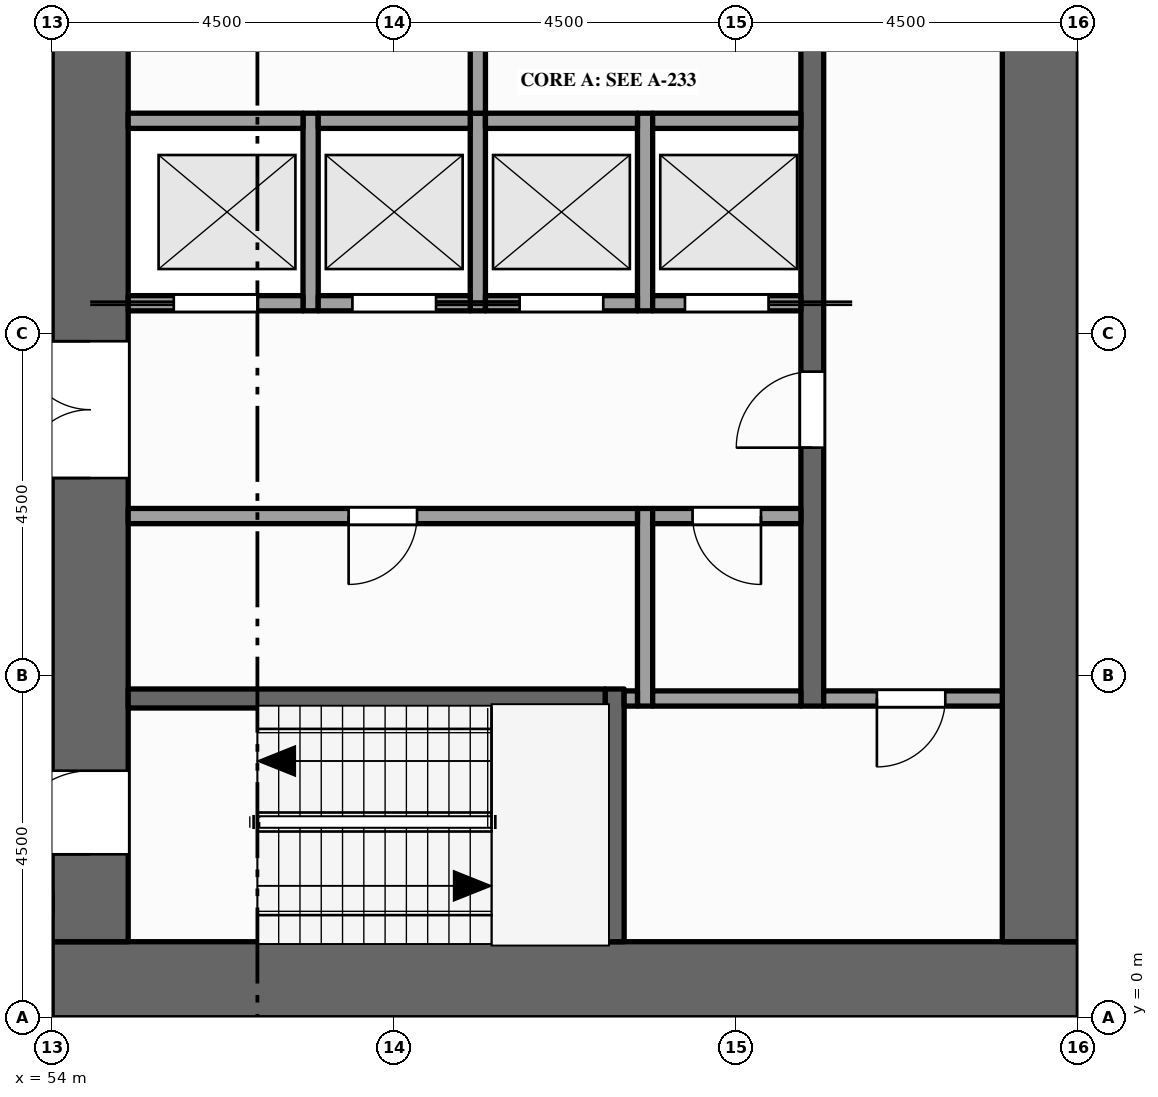
"""IFC4 building model, lengths in metres.
Left out: names, types, materials, properties, quantities, classifications, styles, units other than length and angle.
Written with IfcOpenShell. Run it as: python <this file> out.ifc"""

import sys

from ifc_helpers import new_model, si_unit, direction, frame, frame_2d, origin, place, context, subcontext, project, spatial, rectangle, extrude, element, fill, save


model = new_model("IFC4")
c1 = context("Model", 3, precision=1e-05, world=origin(), true_north=direction((0.0, 1.0)))
c2 = subcontext(c1, "Body", "Model", "MODEL_VIEW")
j1 = project(units=[si_unit("LENGTHUNIT", "METRE"), si_unit("PLANEANGLEUNIT", "RADIAN")], contexts=[c1])
p1 = place(None, origin())
s1 = spatial("IfcSite", under=j1, at=p1, CompositionType="ELEMENT")
p2 = place(p1, origin())
s2 = spatial("IfcBuilding", under=s1, at=p2, CompositionType="ELEMENT")
p3 = place(p2, frame((0.0, 0.0, 183.0)))
s3 = spatial("IfcBuildingStorey", under=s2, at=p3, CompositionType="ELEMENT", Elevation=183.0)
p4 = place(p3, frame((67.5, 0.5, -0.15), z_axis=(0.0, 0.0, 1.0), x_axis=(-1.0, 0.0, 0.0)))
e1 = element("IfcWall", 1, at=p4, inside=s3, PredefinedType="SHEAR", context=c2, shape_type="SweptSolid", body=[
    extrude(rectangle(XDim=13.5, YDim=1.0, at=frame_2d((6.75, 0.0))), origin(), (0.0, 0.0, 1.0), 4.0),
])
p5 = place(p3, frame((54.5, 1.0, -0.15), z_axis=(0.0, 0.0, 1.0), x_axis=(0.0, 1.0, 0.0)))
e2 = element("IfcWall", 2, at=p5, inside=s3, PredefinedType="SHEAR", context=c2, shape_type="SweptSolid", body=[
    extrude(rectangle(XDim=20.5, YDim=1.0, at=frame_2d((10.25, 0.0))), origin(), (0.0, 0.0, 1.0), 4.0),
])
p6 = place(p5, frame((6.1, 0.0, 0.15)))
e3 = element("IfcOpeningElement", 3, at=p6, cuts=e2, PredefinedType="OPENING", context=c2, shape_type="SweptSolid", body=[
    extrude(rectangle(XDim=1.8, YDim=2.1, at=frame_2d((0.9, 1.05))), frame((0.0, 0.51, 0.0), z_axis=(0.0, -1.0, 0.0), x_axis=(1.0, 0.0, 0.0)), (0.0, 0.0, 1.0), 1.02),
])
p7 = place(p5, frame((12.15, 0.0, 0.15)))
e4 = element("IfcOpeningElement", 4, at=p7, cuts=e2, PredefinedType="OPENING", context=c2, shape_type="SweptSolid", body=[
    extrude(rectangle(XDim=1.1, YDim=2.1, at=frame_2d((0.55, 1.05))), frame((0.0, 0.51, 0.0), z_axis=(0.0, -1.0, 0.0), x_axis=(1.0, 0.0, 0.0)), (0.0, 0.0, 1.0), 1.02),
])
p8 = place(p5, frame((1.15, 0.0, 0.15)))
e5 = element("IfcOpeningElement", 5, at=p8, cuts=e2, PredefinedType="OPENING", context=c2, shape_type="SweptSolid", body=[
    extrude(rectangle(XDim=1.1, YDim=2.1, at=frame_2d((0.55, 1.05))), frame((0.0, 0.51, 0.0), z_axis=(0.0, -1.0, 0.0), x_axis=(1.0, 0.0, 0.0)), (0.0, 0.0, 1.0), 1.02),
])
p9 = place(p5, frame((18.35, 0.0, 0.15)))
e6 = element("IfcOpeningElement", 6, at=p9, cuts=e2, PredefinedType="OPENING", context=c2, shape_type="SweptSolid", body=[
    extrude(rectangle(XDim=1.1, YDim=2.1, at=frame_2d((0.55, 1.05))), frame((0.0, 0.51, 0.0), z_axis=(0.0, -1.0, 0.0), x_axis=(1.0, 0.0, 0.0)), (0.0, 0.0, 1.0), 1.02),
])
p10 = place(p3, frame((67.0, 1.0, -0.15), z_axis=(0.0, 0.0, 1.0), x_axis=(0.0, 1.0, 0.0)))
e7 = element("IfcWall", 7, at=p10, inside=s3, PredefinedType="SHEAR", context=c2, shape_type="SweptSolid", body=[
    extrude(rectangle(XDim=20.5, YDim=1.0, at=frame_2d((10.25, 0.0))), origin(), (0.0, 0.0, 1.0), 4.0),
])
for number, where, z_axis, x_axis in (
    (8, (57.4, 9.3, 0.0), (0.0, 0.0, 1.0), (0.0, 1.0, 0.0)),
    (9, (59.6, 9.3, 0.0), (0.0, 0.0, 1.0), (0.0, 1.0, 0.0)),
):
    element("IfcWall", number, at=place(p3, frame(where, z_axis=z_axis, x_axis=x_axis)), inside=s3, PredefinedType="SOLIDWALL", context=c2, shape_type="SweptSolid", body=[
        extrude(rectangle(XDim=2.6, YDim=0.2, at=frame_2d((1.3, 0.0))), origin(), (0.0, 0.0, 1.0), 3.75),
    ])
p11 = place(p3, frame((59.6, 11.9, 0.0), z_axis=(0.0, 0.0, 1.0), x_axis=(0.0, 1.0, 0.0)))
e10 = element("IfcWall", 10, at=p11, inside=s3, PredefinedType="PARTITIONING", context=c2, shape_type="SweptSolid", body=[
    extrude(rectangle(XDim=3.6, YDim=0.2, at=frame_2d((1.8, 0.0))), origin(), (0.0, 0.0, 1.0), 3.75),
])
p12 = place(p11, frame((1.3, 0.0, 0.0)))
e11 = element("IfcOpeningElement", 11, at=p12, cuts=e10, PredefinedType="OPENING", context=c2, shape_type="SweptSolid", body=[
    extrude(rectangle(XDim=1.0, YDim=2.1, at=frame_2d((0.5, 1.05))), frame((0.0, 0.11, 0.0), z_axis=(0.0, -1.0, 0.0), x_axis=(1.0, 0.0, 0.0)), (0.0, 0.0, 1.0), 0.22),
])
p13 = place(p3, frame((61.4, 1.0, 0.0), z_axis=(0.0, 0.0, 1.0), x_axis=(0.0, 1.0, 0.0)))
e12 = element("IfcWall", 12, at=p13, inside=s3, PredefinedType="SHEAR", context=c2, shape_type="SweptSolid", body=[
    extrude(rectangle(XDim=3.325, YDim=0.25, at=frame_2d((1.663, 0.0))), origin(), (0.0, 0.0, 1.0), 3.75),
])
p14 = place(p3, frame((61.8, 4.1, 0.0), z_axis=(0.0, 0.0, 1.0), x_axis=(0.0, 1.0, 0.0)))
e13 = element("IfcWall", 13, at=p14, inside=s3, PredefinedType="PARTITIONING", context=c2, shape_type="SweptSolid", body=[
    extrude(rectangle(XDim=2.6, YDim=0.2, at=frame_2d((1.3, 0.0))), origin(), (0.0, 0.0, 1.0), 3.75),
])
p15 = place(p3, frame((61.8, 9.3, 0.0), z_axis=(0.0, 0.0, 1.0), x_axis=(0.0, 1.0, 0.0)))
e14 = element("IfcWall", 14, at=p15, inside=s3, PredefinedType="SOLIDWALL", context=c2, shape_type="SweptSolid", body=[
    extrude(rectangle(XDim=2.6, YDim=0.2, at=frame_2d((1.3, 0.0))), origin(), (0.0, 0.0, 1.0), 3.75),
])
p16 = place(p3, frame((64.0, 4.1, 0.0), z_axis=(0.0, 0.0, 1.0), x_axis=(0.0, 1.0, 0.0)))
e15 = element("IfcWall", 15, at=p16, inside=s3, PredefinedType="SHEAR", context=c2, shape_type="SweptSolid", body=[
    extrude(rectangle(XDim=14.5, YDim=0.3, at=frame_2d((7.25, 0.0))), origin(), (0.0, 0.0, 1.0), 3.75),
])
p17 = place(p16, frame((3.4, 0.0, 0.0)))
e16 = element("IfcOpeningElement", 16, at=p17, cuts=e15, PredefinedType="OPENING", context=c2, shape_type="SweptSolid", body=[
    extrude(rectangle(XDim=1.0, YDim=2.1, at=frame_2d((0.5, 1.05))), frame((0.0, 0.16, 0.0), z_axis=(0.0, -1.0, 0.0), x_axis=(1.0, 0.0, 0.0)), (0.0, 0.0, 1.0), 0.32),
])
p18 = place(p16, frame((9.1, 0.0, 0.0)))
e17 = element("IfcOpeningElement", 17, at=p18, cuts=e15, PredefinedType="OPENING", context=c2, shape_type="SweptSolid", body=[
    extrude(rectangle(XDim=1.0, YDim=2.1, at=frame_2d((0.5, 1.05))), frame((0.0, 0.16, 0.0), z_axis=(0.0, -1.0, 0.0), x_axis=(1.0, 0.0, 0.0)), (0.0, 0.0, 1.0), 0.32),
])
p19 = place(p3, frame((55.0, 4.2, 0.0), z_axis=(0.0, 0.0, 1.0), x_axis=(1.0, 0.0, 0.0)))
e18 = element("IfcWall", 18, at=p19, inside=s3, PredefinedType="SHEAR", context=c2, shape_type="SweptSolid", body=[
    extrude(rectangle(XDim=6.275, YDim=0.25, at=frame_2d((3.137, 0.0))), origin(), (0.0, 0.0, 1.0), 3.75),
])
p20 = place(p3, frame((61.525, 4.2, 0.0), z_axis=(0.0, 0.0, 1.0), x_axis=(1.0, 0.0, 0.0)))
e19 = element("IfcWall", 19, at=p20, inside=s3, PredefinedType="PARTITIONING", context=c2, shape_type="SweptSolid", body=[
    extrude(rectangle(XDim=0.175, YDim=0.2, at=frame_2d((0.087, 0.0))), origin(), (0.0, 0.0, 1.0), 3.75),
])
p21 = place(p3, frame((61.9, 4.2, 0.0), z_axis=(0.0, 0.0, 1.0), x_axis=(1.0, 0.0, 0.0)))
e20 = element("IfcWall", 20, at=p21, inside=s3, PredefinedType="PARTITIONING", context=c2, shape_type="SweptSolid", body=[
    extrude(rectangle(XDim=1.95, YDim=0.2, at=frame_2d((0.975, 0.0))), origin(), (0.0, 0.0, 1.0), 3.75),
])
p22 = place(p3, frame((64.15, 4.2, 0.0), z_axis=(0.0, 0.0, 1.0), x_axis=(1.0, 0.0, 0.0)))
e21 = element("IfcWall", 21, at=p22, inside=s3, PredefinedType="PARTITIONING", context=c2, shape_type="SweptSolid", body=[
    extrude(rectangle(XDim=2.35, YDim=0.2, at=frame_2d((1.175, 0.0))), origin(), (0.0, 0.0, 1.0), 3.75),
])
p23 = place(p22, frame((0.7, 0.0, 0.0)))
e22 = element("IfcOpeningElement", 22, at=p23, cuts=e21, PredefinedType="OPENING", context=c2, shape_type="SweptSolid", body=[
    extrude(rectangle(XDim=0.9, YDim=2.1, at=frame_2d((0.45, 1.05))), frame((0.0, 0.11, 0.0), z_axis=(0.0, -1.0, 0.0), x_axis=(1.0, 0.0, 0.0)), (0.0, 0.0, 1.0), 0.22),
])
p24 = place(p3, frame((55.0, 6.6, 0.0), z_axis=(0.0, 0.0, 1.0), x_axis=(1.0, 0.0, 0.0)))
e23 = element("IfcWall", 23, at=p24, inside=s3, PredefinedType="PARTITIONING", context=c2, shape_type="SweptSolid", body=[
    extrude(rectangle(XDim=6.7, YDim=0.2, at=frame_2d((3.35, 0.0))), origin(), (0.0, 0.0, 1.0), 3.75),
])
p25 = place(p24, frame((2.9, 0.0, 0.0)))
e24 = element("IfcOpeningElement", 24, at=p25, cuts=e23, PredefinedType="OPENING", context=c2, shape_type="SweptSolid", body=[
    extrude(rectangle(XDim=0.9, YDim=2.1, at=frame_2d((0.45, 1.05))), frame((0.0, 0.11, 0.0), z_axis=(0.0, -1.0, 0.0), x_axis=(1.0, 0.0, 0.0)), (0.0, 0.0, 1.0), 0.22),
])
p26 = place(p3, frame((61.9, 6.6, 0.0), z_axis=(0.0, 0.0, 1.0), x_axis=(1.0, 0.0, 0.0)))
e25 = element("IfcWall", 25, at=p26, inside=s3, PredefinedType="PARTITIONING", context=c2, shape_type="SweptSolid", body=[
    extrude(rectangle(XDim=1.95, YDim=0.2, at=frame_2d((0.975, 0.0))), origin(), (0.0, 0.0, 1.0), 3.75),
])
p27 = place(p26, frame((0.525, 0.0, 0.0)))
e26 = element("IfcOpeningElement", 26, at=p27, cuts=e25, PredefinedType="OPENING", context=c2, shape_type="SweptSolid", body=[
    extrude(rectangle(XDim=0.9, YDim=2.1, at=frame_2d((0.45, 1.05))), frame((0.0, 0.11, 0.0), z_axis=(0.0, -1.0, 0.0), x_axis=(1.0, 0.0, 0.0)), (0.0, 0.0, 1.0), 0.22),
])
p28 = place(p3, frame((55.0, 9.4, 0.0), z_axis=(0.0, 0.0, 1.0), x_axis=(1.0, 0.0, 0.0)))
e27 = element("IfcWall", 27, at=p28, inside=s3, PredefinedType="SOLIDWALL", context=c2, shape_type="SweptSolid", body=[
    extrude(rectangle(XDim=2.3, YDim=0.2, at=frame_2d((1.15, 0.0))), origin(), (0.0, 0.0, 1.0), 3.75),
])
p29 = place(p28, frame((0.6, 0.0, 0.012)))
e28 = element("IfcOpeningElement", 28, at=p29, cuts=e27, PredefinedType="OPENING", context=c2, shape_type="SweptSolid", body=[
    extrude(rectangle(XDim=1.1, YDim=2.1, at=frame_2d((0.55, 1.05))), frame((0.0, 0.11, 0.0), z_axis=(0.0, -1.0, 0.0), x_axis=(1.0, 0.0, 0.0)), (0.0, 0.0, 1.0), 0.22),
])
p30 = place(p3, frame((57.5, 9.4, 0.0), z_axis=(0.0, 0.0, 1.0), x_axis=(1.0, 0.0, 0.0)))
e29 = element("IfcWall", 29, at=p30, inside=s3, PredefinedType="SOLIDWALL", context=c2, shape_type="SweptSolid", body=[
    extrude(rectangle(XDim=2.0, YDim=0.2, at=frame_2d((1.0, 0.0))), origin(), (0.0, 0.0, 1.0), 3.75),
])
p31 = place(p30, frame((0.45, 0.0, 0.012)))
e30 = element("IfcOpeningElement", 30, at=p31, cuts=e29, PredefinedType="OPENING", context=c2, shape_type="SweptSolid", body=[
    extrude(rectangle(XDim=1.1, YDim=2.1, at=frame_2d((0.55, 1.05))), frame((0.0, 0.11, 0.0), z_axis=(0.0, -1.0, 0.0), x_axis=(1.0, 0.0, 0.0)), (0.0, 0.0, 1.0), 0.22),
])
p32 = place(p3, frame((59.7, 9.4, 0.0), z_axis=(0.0, 0.0, 1.0), x_axis=(1.0, 0.0, 0.0)))
e31 = element("IfcWall", 31, at=p32, inside=s3, PredefinedType="SOLIDWALL", context=c2, shape_type="SweptSolid", body=[
    extrude(rectangle(XDim=2.0, YDim=0.2, at=frame_2d((1.0, 0.0))), origin(), (0.0, 0.0, 1.0), 3.75),
])
p33 = place(p32, frame((0.45, 0.0, 0.012)))
e32 = element("IfcOpeningElement", 32, at=p33, cuts=e31, PredefinedType="OPENING", context=c2, shape_type="SweptSolid", body=[
    extrude(rectangle(XDim=1.1, YDim=2.1, at=frame_2d((0.55, 1.05))), frame((0.0, 0.11, 0.0), z_axis=(0.0, -1.0, 0.0), x_axis=(1.0, 0.0, 0.0)), (0.0, 0.0, 1.0), 0.22),
])
p34 = place(p3, frame((61.9, 9.4, 0.0), z_axis=(0.0, 0.0, 1.0), x_axis=(1.0, 0.0, 0.0)))
e33 = element("IfcWall", 33, at=p34, inside=s3, PredefinedType="SOLIDWALL", context=c2, shape_type="SweptSolid", body=[
    extrude(rectangle(XDim=1.95, YDim=0.2, at=frame_2d((0.975, 0.0))), origin(), (0.0, 0.0, 1.0), 3.75),
])
p35 = place(p34, frame((0.425, 0.0, 0.012)))
e34 = element("IfcOpeningElement", 34, at=p35, cuts=e33, PredefinedType="OPENING", context=c2, shape_type="SweptSolid", body=[
    extrude(rectangle(XDim=1.1, YDim=2.1, at=frame_2d((0.55, 1.05))), frame((0.0, 0.11, 0.0), z_axis=(0.0, -1.0, 0.0), x_axis=(1.0, 0.0, 0.0)), (0.0, 0.0, 1.0), 0.22),
])
p36 = place(p3, frame((55.0, 11.8, 0.0), z_axis=(0.0, 0.0, 1.0), x_axis=(1.0, 0.0, 0.0)))
e35 = element("IfcWall", 35, at=p36, inside=s3, PredefinedType="SOLIDWALL", context=c2, shape_type="SweptSolid", body=[
    extrude(rectangle(XDim=2.3, YDim=0.2, at=frame_2d((1.15, 0.0))), origin(), (0.0, 0.0, 1.0), 3.75),
])
for number, where, z_axis, x_axis in (
    (36, (57.5, 11.8, 0.0), (0.0, 0.0, 1.0), (1.0, 0.0, 0.0)),
    (37, (59.7, 11.8, 0.0), (0.0, 0.0, 1.0), (1.0, 0.0, 0.0)),
):
    element("IfcWall", number, at=place(p3, frame(where, z_axis=z_axis, x_axis=x_axis)), inside=s3, PredefinedType="SOLIDWALL", context=c2, shape_type="SweptSolid", body=[
        extrude(rectangle(XDim=2.0, YDim=0.2, at=frame_2d((1.0, 0.0))), origin(), (0.0, 0.0, 1.0), 3.75),
    ])
p37 = place(p3, frame((61.9, 11.8, 0.0), z_axis=(0.0, 0.0, 1.0), x_axis=(1.0, 0.0, 0.0)))
e38 = element("IfcWall", 38, at=p37, inside=s3, PredefinedType="SOLIDWALL", context=c2, shape_type="SweptSolid", body=[
    extrude(rectangle(XDim=1.95, YDim=0.2, at=frame_2d((0.975, 0.0))), origin(), (0.0, 0.0, 1.0), 3.75),
])
p38 = place(p29, origin())
e39 = element("IfcDoor", 39, at=p38, inside=s3, OperationType="SLIDING_TO_LEFT", PredefinedType="DOOR", context=c2, shape_type="SweptSolid", body=[
    extrude(rectangle(XDim=1.1, YDim=2.1, at=frame_2d((0.55, 1.05))), frame((0.0, 0.025, 0.0), z_axis=(0.0, -1.0, 0.0), x_axis=(1.0, 0.0, 0.0)), (0.0, 0.0, 1.0), 0.05),
])
fill(e28, e39)
p39 = place(p31, origin())
e40 = element("IfcDoor", 40, at=p39, inside=s3, OperationType="SLIDING_TO_RIGHT", PredefinedType="DOOR", context=c2, shape_type="SweptSolid", body=[
    extrude(rectangle(XDim=1.1, YDim=2.1, at=frame_2d((0.55, 1.05))), frame((0.0, 0.025, 0.0), z_axis=(0.0, -1.0, 0.0), x_axis=(1.0, 0.0, 0.0)), (0.0, 0.0, 1.0), 0.05),
])
fill(e30, e40)
p40 = place(p33, origin())
e41 = element("IfcDoor", 41, at=p40, inside=s3, OperationType="SLIDING_TO_LEFT", PredefinedType="DOOR", context=c2, shape_type="SweptSolid", body=[
    extrude(rectangle(XDim=1.1, YDim=2.1, at=frame_2d((0.55, 1.05))), frame((0.0, 0.025, 0.0), z_axis=(0.0, -1.0, 0.0), x_axis=(1.0, 0.0, 0.0)), (0.0, 0.0, 1.0), 0.05),
])
fill(e32, e41)
p41 = place(p35, origin())
e42 = element("IfcDoor", 42, at=p41, inside=s3, OperationType="SLIDING_TO_RIGHT", PredefinedType="DOOR", context=c2, shape_type="SweptSolid", body=[
    extrude(rectangle(XDim=1.1, YDim=2.1, at=frame_2d((0.55, 1.05))), frame((0.0, 0.025, 0.0), z_axis=(0.0, -1.0, 0.0), x_axis=(1.0, 0.0, 0.0)), (0.0, 0.0, 1.0), 0.05),
])
fill(e34, e42)
p42 = place(p6, origin())
e43 = element("IfcDoor", 43, at=p42, inside=s3, OperationType="DOUBLE_DOOR_SINGLE_SWING", PredefinedType="DOOR", context=c2, shape_type="SweptSolid", body=[
    extrude(rectangle(XDim=1.8, YDim=2.1, at=frame_2d((0.9, 1.05))), frame((0.0, 0.025, 0.0), z_axis=(0.0, -1.0, 0.0), x_axis=(1.0, 0.0, 0.0)), (0.0, 0.0, 1.0), 0.05),
])
fill(e3, e43)
p43 = place(p17, origin())
e44 = element("IfcDoor", 44, at=p43, inside=s3, OperationType="SINGLE_SWING_LEFT", PredefinedType="DOOR", context=c2, shape_type="SweptSolid", body=[
    extrude(rectangle(XDim=1.0, YDim=2.1, at=frame_2d((0.5, 1.05))), frame((0.0, 0.025, 0.0), z_axis=(0.0, -1.0, 0.0), x_axis=(1.0, 0.0, 0.0)), (0.0, 0.0, 1.0), 0.05),
])
fill(e16, e44)
p44 = place(p8, origin())
e45 = element("IfcDoor", 45, at=p44, inside=s3, OperationType="SINGLE_SWING_LEFT", PredefinedType="DOOR", context=c2, shape_type="SweptSolid", body=[
    extrude(rectangle(XDim=1.1, YDim=2.1, at=frame_2d((0.55, 1.05))), frame((0.0, 0.025, 0.0), z_axis=(0.0, -1.0, 0.0), x_axis=(1.0, 0.0, 0.0)), (0.0, 0.0, 1.0), 0.05),
])
fill(e5, e45)
p45 = place(p23, origin())
e46 = element("IfcDoor", 46, at=p45, inside=s3, OperationType="SINGLE_SWING_LEFT", PredefinedType="DOOR", context=c2, shape_type="SweptSolid", body=[
    extrude(rectangle(XDim=0.9, YDim=2.1, at=frame_2d((0.45, 1.05))), frame((0.0, 0.025, 0.0), z_axis=(0.0, -1.0, 0.0), x_axis=(1.0, 0.0, 0.0)), (0.0, 0.0, 1.0), 0.05),
])
fill(e22, e46)
p46 = place(p25, origin())
e47 = element("IfcDoor", 47, at=p46, inside=s3, OperationType="SINGLE_SWING_LEFT", PredefinedType="DOOR", context=c2, shape_type="SweptSolid", body=[
    extrude(rectangle(XDim=0.9, YDim=2.1, at=frame_2d((0.45, 1.05))), frame((0.0, 0.025, 0.0), z_axis=(0.0, -1.0, 0.0), x_axis=(1.0, 0.0, 0.0)), (0.0, 0.0, 1.0), 0.05),
])
fill(e24, e47)
p47 = place(p27, origin())
e48 = element("IfcDoor", 48, at=p47, inside=s3, OperationType="SINGLE_SWING_RIGHT", PredefinedType="DOOR", context=c2, shape_type="SweptSolid", body=[
    extrude(rectangle(XDim=0.9, YDim=2.1, at=frame_2d((0.45, 1.05))), frame((0.0, 0.025, 0.0), z_axis=(0.0, -1.0, 0.0), x_axis=(1.0, 0.0, 0.0)), (0.0, 0.0, 1.0), 0.05),
])
fill(e26, e48)
save(model, sys.argv[1])
